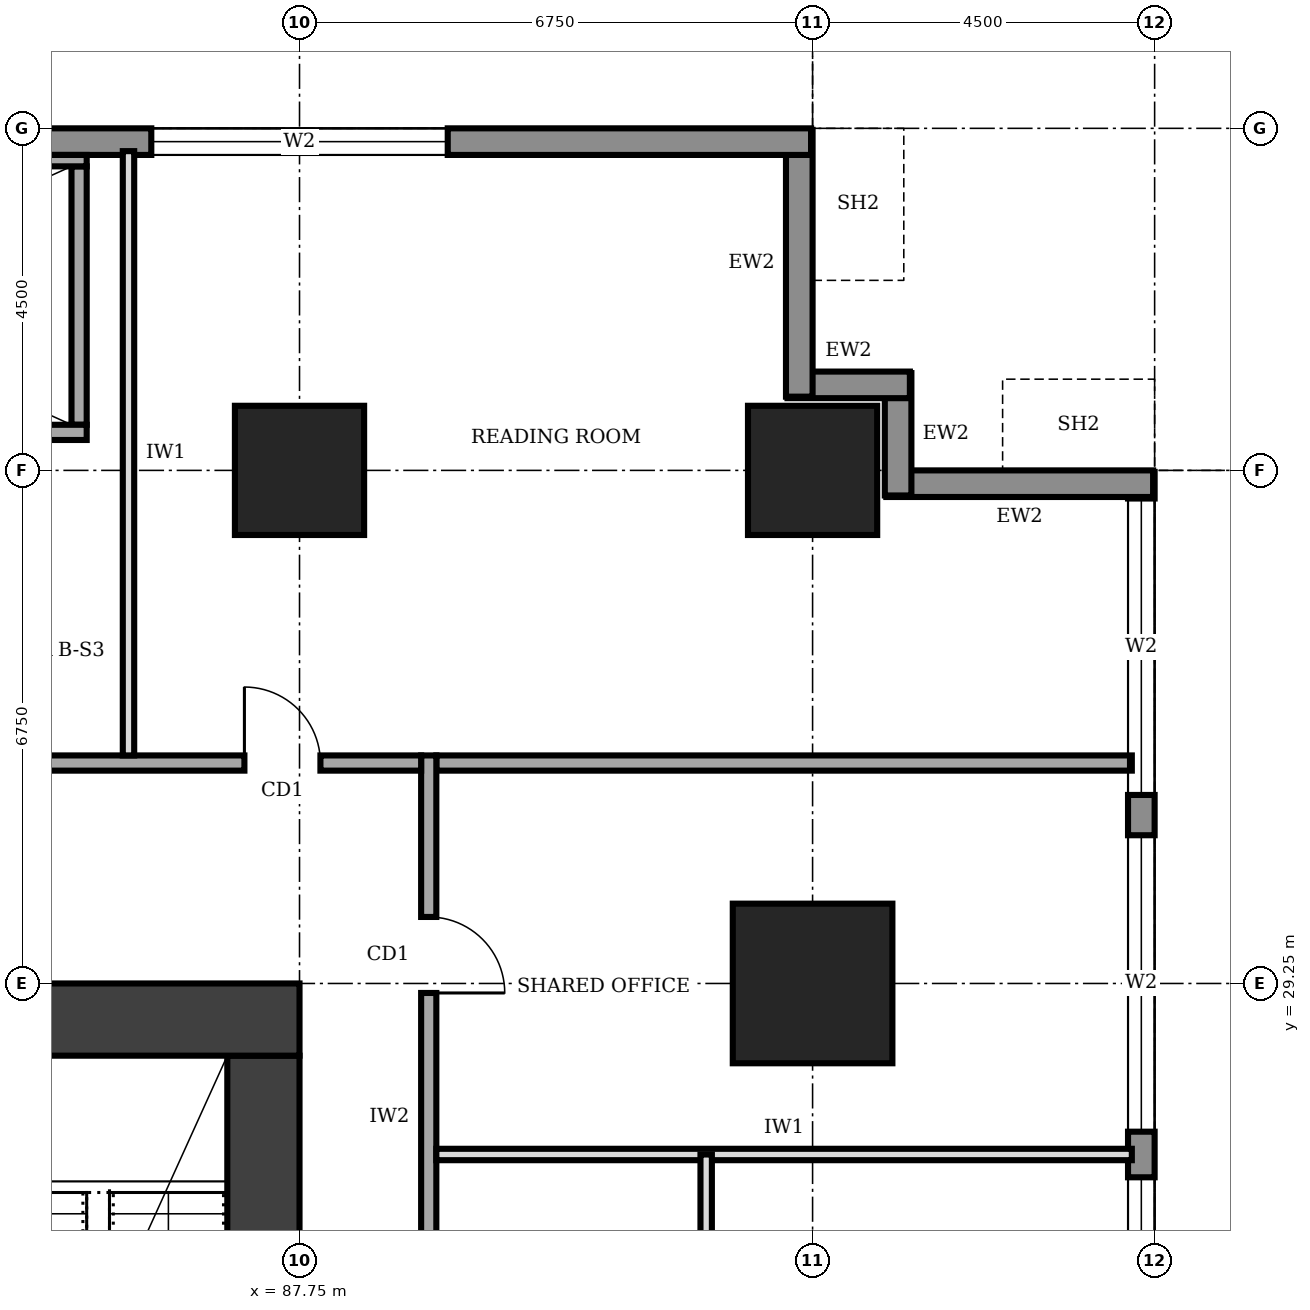
"""IFC4 building model, lengths in metres.
Left out: names, types, materials, properties, quantities, classifications, styles, units other than length and angle.
Written with IfcOpenShell. Run it as: python <this file> out.ifc"""

import sys

from ifc_helpers import new_model, si_unit, direction, frame, frame_2d, origin, origin_2d, place, context, subcontext, project, spatial, rectangle, extrude, element, fill, save


model = new_model("IFC4")
c1 = context("Model", 3, precision=1e-05, world=origin(), true_north=direction((0.0, 1.0)))
c2 = subcontext(c1, "Body", "Model", "MODEL_VIEW")
j1 = project(units=[si_unit("LENGTHUNIT", "METRE"), si_unit("PLANEANGLEUNIT", "RADIAN")], contexts=[c1])
p1 = place(None, origin())
s1 = spatial("IfcSite", under=j1, at=p1, CompositionType="ELEMENT")
p2 = place(p1, origin())
s2 = spatial("IfcBuilding", under=s1, at=p2, CompositionType="ELEMENT")
p3 = place(p2, frame((0.0, 0.0, 53.0)))
s3 = spatial("IfcBuildingStorey", under=s2, at=p3, CompositionType="ELEMENT", Elevation=53.0)
p4 = place(p3, frame((87.275, 12.2, 0.0), z_axis=(0.0, 0.0, 1.0), x_axis=(0.0, 1.0, 0.0)))
e1 = element("IfcWall", 1, at=p4, inside=s3, PredefinedType="SHEAR", context=c2, shape_type="SweptSolid", body=[
    extrude(rectangle(XDim=16.1, YDim=0.95, at=frame_2d((8.05, 0.0))), origin(), (0.0, 0.0, 1.0), 4.0),
])
p5 = place(p3, frame((87.75, 28.775, 0.0), z_axis=(0.0, 0.0, 1.0), x_axis=(-1.0, 0.0, 0.0)))
e2 = element("IfcWall", 2, at=p5, inside=s3, PredefinedType="SHEAR", context=c2, shape_type="SweptSolid", body=[
    extrude(rectangle(XDim=13.5, YDim=0.95, at=frame_2d((6.75, 0.0))), origin(), (0.0, 0.0, 1.0), 4.0),
])
p6 = place(p5, frame((4.75, 0.0, 0.0)))
e3 = element("IfcOpeningElement", 3, at=p6, cuts=e2, PredefinedType="OPENING", context=c2, shape_type="SweptSolid", body=[
    extrude(rectangle(XDim=1.8, YDim=2.1, at=frame_2d((0.9, 1.05))), frame((0.0, 0.485, 0.0), z_axis=(0.0, -1.0, 0.0), x_axis=(1.0, 0.0, 0.0)), (0.0, 0.0, 1.0), 0.97),
])
p7 = place(p3, frame((94.5, 29.25, 0.0), z_axis=(0.0, 0.0, 1.0), x_axis=(1.0, 0.0, 0.0)))
e4 = element("IfcColumn", 4, at=p7, inside=s3, PredefinedType="COLUMN", context=c2, shape_type="SweptSolid", body=[
    extrude(rectangle(XDim=2.1, YDim=2.1, at=origin_2d()), origin(), (0.0, 0.0, 1.0), 4.0),
])
for number, where, z_axis, x_axis in (
    (5, (87.75, 36.0, 0.0), (0.0, 0.0, 1.0), (1.0, 0.0, 0.0)),
    (6, (94.5, 36.0, 0.0), (0.0, 0.0, 1.0), (1.0, 0.0, 0.0)),
):
    element("IfcColumn", number, at=place(p3, frame(where, z_axis=z_axis, x_axis=x_axis)), inside=s3, PredefinedType="COLUMN", context=c2, shape_type="SweptSolid", body=[
        extrude(rectangle(XDim=1.7, YDim=1.7, at=origin_2d()), origin(), (0.0, 0.0, 1.0), 4.0),
    ])
p8 = place(p3, frame((98.825, 4.52, 0.0), z_axis=(0.0, 0.0, 1.0), x_axis=(0.0, 1.0, 0.0)))
e7 = element("IfcWall", 7, at=p8, inside=s3, PredefinedType="STANDARD", context=c2, shape_type="SweptSolid", body=[
    extrude(rectangle(XDim=31.46, YDim=0.35, at=frame_2d((15.73, 0.0))), origin(), (0.0, 0.0, 1.0), 3.75),
])
p9 = place(p8, frame((4.78, 0.0, 0.6)))
e8 = element("IfcOpeningElement", 8, at=p9, cuts=e7, PredefinedType="OPENING", context=c2, shape_type="SweptSolid", body=[
    extrude(rectangle(XDim=3.9, YDim=2.6, at=frame_2d((1.95, 1.3))), frame((0.0, 0.185, 0.0), z_axis=(0.0, -1.0, 0.0), x_axis=(1.0, 0.0, 0.0)), (0.0, 0.0, 1.0), 0.37),
])
p10 = place(p8, frame((9.28, 0.0, 0.6)))
e9 = element("IfcOpeningElement", 9, at=p10, cuts=e7, PredefinedType="OPENING", context=c2, shape_type="SweptSolid", body=[
    extrude(rectangle(XDim=3.9, YDim=2.6, at=frame_2d((1.95, 1.3))), frame((0.0, 0.185, 0.0), z_axis=(0.0, -1.0, 0.0), x_axis=(1.0, 0.0, 0.0)), (0.0, 0.0, 1.0), 0.37),
])
p11 = place(p8, frame((13.78, 0.0, 0.6)))
e10 = element("IfcOpeningElement", 10, at=p11, cuts=e7, PredefinedType="OPENING", context=c2, shape_type="SweptSolid", body=[
    extrude(rectangle(XDim=3.9, YDim=2.6, at=frame_2d((1.95, 1.3))), frame((0.0, 0.185, 0.0), z_axis=(0.0, -1.0, 0.0), x_axis=(1.0, 0.0, 0.0)), (0.0, 0.0, 1.0), 0.37),
])
p12 = place(p8, frame((18.28, 0.0, 0.6)))
e11 = element("IfcOpeningElement", 11, at=p12, cuts=e7, PredefinedType="OPENING", context=c2, shape_type="SweptSolid", body=[
    extrude(rectangle(XDim=3.9, YDim=2.6, at=frame_2d((1.95, 1.3))), frame((0.0, 0.185, 0.0), z_axis=(0.0, -1.0, 0.0), x_axis=(1.0, 0.0, 0.0)), (0.0, 0.0, 1.0), 0.37),
])
p13 = place(p8, frame((22.78, 0.0, 0.6)))
e12 = element("IfcOpeningElement", 12, at=p13, cuts=e7, PredefinedType="OPENING", context=c2, shape_type="SweptSolid", body=[
    extrude(rectangle(XDim=3.9, YDim=2.6, at=frame_2d((1.95, 1.3))), frame((0.0, 0.185, 0.0), z_axis=(0.0, -1.0, 0.0), x_axis=(1.0, 0.0, 0.0)), (0.0, 0.0, 1.0), 0.37),
])
p14 = place(p8, frame((27.21, 0.0, 0.6)))
e13 = element("IfcOpeningElement", 13, at=p14, cuts=e7, PredefinedType="OPENING", context=c2, shape_type="SweptSolid", body=[
    extrude(rectangle(XDim=3.9, YDim=2.6, at=frame_2d((1.95, 1.3))), frame((0.0, 0.185, 0.0), z_axis=(0.0, -1.0, 0.0), x_axis=(1.0, 0.0, 0.0)), (0.0, 0.0, 1.0), 0.37),
])
p15 = place(p3, frame((98.98, 35.825, 0.0), z_axis=(0.0, 0.0, 1.0), x_axis=(-1.0, 0.0, 0.0)))
e14 = element("IfcWall", 14, at=p15, inside=s3, PredefinedType="STANDARD", context=c2, shape_type="SweptSolid", body=[
    extrude(rectangle(XDim=3.51, YDim=0.35, at=frame_2d((1.755, 0.0))), origin(), (0.0, 0.0, 1.0), 2.85),
])
for number, where, z_axis, x_axis in (
    (15, (95.625, 35.67, 0.0), (0.0, 0.0, 1.0), (0.0, 1.0, 0.0)),
    (16, (95.78, 37.125, 0.0), (0.0, 0.0, 1.0), (-1.0, 0.0, 0.0)),
):
    element("IfcWall", number, at=place(p3, frame(where, z_axis=z_axis, x_axis=x_axis)), inside=s3, PredefinedType="STANDARD", context=c2, shape_type="SweptSolid", body=[
        extrude(rectangle(XDim=1.61, YDim=0.35, at=frame_2d((0.805, 0.0))), origin(), (0.0, 0.0, 1.0), 3.75),
    ])
p16 = place(p3, frame((94.325, 36.97, 0.0), z_axis=(0.0, 0.0, 1.0), x_axis=(0.0, 1.0, 0.0)))
e17 = element("IfcWall", 17, at=p16, inside=s3, PredefinedType="STANDARD", context=c2, shape_type="SweptSolid", body=[
    extrude(rectangle(XDim=3.51, YDim=0.35, at=frame_2d((1.755, 0.0))), origin(), (0.0, 0.0, 1.0), 2.85),
])
p17 = place(p3, frame((94.48, 40.325, 0.0), z_axis=(0.0, 0.0, 1.0), x_axis=(-1.0, 0.0, 0.0)))
e18 = element("IfcWall", 18, at=p17, inside=s3, PredefinedType="STANDARD", context=c2, shape_type="SweptSolid", body=[
    extrude(rectangle(XDim=26.96, YDim=0.35, at=frame_2d((13.48, 0.0))), origin(), (0.0, 0.0, 1.0), 3.75),
])
p18 = place(p17, frame((22.71, 0.0, 0.6)))
e19 = element("IfcOpeningElement", 19, at=p18, cuts=e18, PredefinedType="OPENING", context=c2, shape_type="SweptSolid", body=[
    extrude(rectangle(XDim=3.9, YDim=2.6, at=frame_2d((1.95, 1.3))), frame((0.0, 0.185, 0.0), z_axis=(0.0, -1.0, 0.0), x_axis=(1.0, 0.0, 0.0)), (0.0, 0.0, 1.0), 0.37),
])
p19 = place(p17, frame((18.28, 0.0, 0.6)))
e20 = element("IfcOpeningElement", 20, at=p19, cuts=e18, PredefinedType="OPENING", context=c2, shape_type="SweptSolid", body=[
    extrude(rectangle(XDim=3.9, YDim=2.6, at=frame_2d((1.95, 1.3))), frame((0.0, 0.185, 0.0), z_axis=(0.0, -1.0, 0.0), x_axis=(1.0, 0.0, 0.0)), (0.0, 0.0, 1.0), 0.37),
])
p20 = place(p17, frame((4.78, 0.0, 0.6)))
e21 = element("IfcOpeningElement", 21, at=p20, cuts=e18, PredefinedType="OPENING", context=c2, shape_type="SweptSolid", body=[
    extrude(rectangle(XDim=3.9, YDim=2.6, at=frame_2d((1.95, 1.3))), frame((0.0, 0.185, 0.0), z_axis=(0.0, -1.0, 0.0), x_axis=(1.0, 0.0, 0.0)), (0.0, 0.0, 1.0), 0.37),
])
p21 = place(p3, frame((89.45, 9.2, 0.0), z_axis=(0.0, 0.0, 1.0), x_axis=(0.0, 1.0, 0.0)))
e22 = element("IfcWall", 22, at=p21, inside=s3, PredefinedType="SOLIDWALL", context=c2, shape_type="SweptSolid", body=[
    extrude(rectangle(XDim=23.05, YDim=0.2, at=frame_2d((11.525, 0.0))), origin(), (0.0, 0.0, 1.0), 3.75),
])
p22 = place(p21, frame((1.55, 0.0, 0.0)))
e23 = element("IfcOpeningElement", 23, at=p22, cuts=e22, PredefinedType="OPENING", context=c2, shape_type="SweptSolid", body=[
    extrude(rectangle(XDim=1.0, YDim=2.1, at=frame_2d((0.5, 1.05))), frame((0.0, 0.11, 0.0), z_axis=(0.0, -1.0, 0.0), x_axis=(1.0, 0.0, 0.0)), (0.0, 0.0, 1.0), 0.22),
])
p23 = place(p21, frame((4.9, 0.0, 0.0)))
e24 = element("IfcOpeningElement", 24, at=p23, cuts=e22, PredefinedType="OPENING", context=c2, shape_type="SweptSolid", body=[
    extrude(rectangle(XDim=1.0, YDim=2.1, at=frame_2d((0.5, 1.05))), frame((0.0, 0.11, 0.0), z_axis=(0.0, -1.0, 0.0), x_axis=(1.0, 0.0, 0.0)), (0.0, 0.0, 1.0), 0.22),
])
p24 = place(p21, frame((8.0, 0.0, 0.0)))
e25 = element("IfcOpeningElement", 25, at=p24, cuts=e22, PredefinedType="OPENING", context=c2, shape_type="SweptSolid", body=[
    extrude(rectangle(XDim=0.9, YDim=2.1, at=frame_2d((0.45, 1.05))), frame((0.0, 0.11, 0.0), z_axis=(0.0, -1.0, 0.0), x_axis=(1.0, 0.0, 0.0)), (0.0, 0.0, 1.0), 0.22),
])
p25 = place(p21, frame((11.05, 0.0, 0.0)))
e26 = element("IfcOpeningElement", 26, at=p25, cuts=e22, PredefinedType="OPENING", context=c2, shape_type="SweptSolid", body=[
    extrude(rectangle(XDim=0.9, YDim=2.1, at=frame_2d((0.45, 1.05))), frame((0.0, 0.11, 0.0), z_axis=(0.0, -1.0, 0.0), x_axis=(1.0, 0.0, 0.0)), (0.0, 0.0, 1.0), 0.22),
])
p26 = place(p21, frame((15.75, 0.0, 0.0)))
e27 = element("IfcOpeningElement", 27, at=p26, cuts=e22, PredefinedType="OPENING", context=c2, shape_type="SweptSolid", body=[
    extrude(rectangle(XDim=0.9, YDim=2.1, at=frame_2d((0.45, 1.05))), frame((0.0, 0.11, 0.0), z_axis=(0.0, -1.0, 0.0), x_axis=(1.0, 0.0, 0.0)), (0.0, 0.0, 1.0), 0.22),
])
p27 = place(p21, frame((13.1, 0.0, 0.0)))
e28 = element("IfcOpeningElement", 28, at=p27, cuts=e22, PredefinedType="OPENING", context=c2, shape_type="SweptSolid", body=[
    extrude(rectangle(XDim=1.0, YDim=2.1, at=frame_2d((0.5, 1.05))), frame((0.0, 0.11, 0.0), z_axis=(0.0, -1.0, 0.0), x_axis=(1.0, 0.0, 0.0)), (0.0, 0.0, 1.0), 0.22),
])
p28 = place(p21, frame((19.925, 0.0, 0.0)))
e29 = element("IfcOpeningElement", 29, at=p28, cuts=e22, PredefinedType="OPENING", context=c2, shape_type="SweptSolid", body=[
    extrude(rectangle(XDim=1.0, YDim=2.1, at=frame_2d((0.5, 1.05))), frame((0.0, 0.11, 0.0), z_axis=(0.0, -1.0, 0.0), x_axis=(1.0, 0.0, 0.0)), (0.0, 0.0, 1.0), 0.22),
])
p29 = place(p3, frame((89.35, 32.15, 0.0), z_axis=(0.0, 0.0, 1.0), x_axis=(-1.0, 0.0, 0.0)))
e30 = element("IfcWall", 30, at=p29, inside=s3, PredefinedType="SOLIDWALL", context=c2, shape_type="SweptSolid", body=[
    extrude(rectangle(XDim=17.65, YDim=0.2, at=frame_2d((8.825, 0.0))), origin(), (0.0, 0.0, 1.0), 3.75),
])
p30 = place(p29, frame((14.75, 0.0, 0.0)))
e31 = element("IfcOpeningElement", 31, at=p30, cuts=e30, PredefinedType="OPENING", context=c2, shape_type="SweptSolid", body=[
    extrude(rectangle(XDim=1.0, YDim=2.1, at=frame_2d((0.5, 1.05))), frame((0.0, 0.11, 0.0), z_axis=(0.0, -1.0, 0.0), x_axis=(1.0, 0.0, 0.0)), (0.0, 0.0, 1.0), 0.22),
])
p31 = place(p29, frame((7.85, 0.0, 0.0)))
e32 = element("IfcOpeningElement", 32, at=p31, cuts=e30, PredefinedType="OPENING", context=c2, shape_type="SweptSolid", body=[
    extrude(rectangle(XDim=1.0, YDim=2.1, at=frame_2d((0.5, 1.05))), frame((0.0, 0.11, 0.0), z_axis=(0.0, -1.0, 0.0), x_axis=(1.0, 0.0, 0.0)), (0.0, 0.0, 1.0), 0.22),
])
p32 = place(p29, frame((1.325, 0.0, 0.0)))
e33 = element("IfcOpeningElement", 33, at=p32, cuts=e30, PredefinedType="OPENING", context=c2, shape_type="SweptSolid", body=[
    extrude(rectangle(XDim=1.0, YDim=2.1, at=frame_2d((0.5, 1.05))), frame((0.0, 0.11, 0.0), z_axis=(0.0, -1.0, 0.0), x_axis=(1.0, 0.0, 0.0)), (0.0, 0.0, 1.0), 0.22),
])
p33 = place(p3, frame((89.55, 32.15, 0.0), z_axis=(0.0, 0.0, 1.0), x_axis=(1.0, 0.0, 0.0)))
e34 = element("IfcWall", 34, at=p33, inside=s3, PredefinedType="SOLIDWALL", context=c2, shape_type="SweptSolid", body=[
    extrude(rectangle(XDim=9.15, YDim=0.2, at=frame_2d((4.575, 0.0))), origin(), (0.0, 0.0, 1.0), 3.75),
])
p34 = place(p3, frame((85.5, 32.25, 0.0), z_axis=(0.0, 0.0, 1.0), x_axis=(0.0, 1.0, 0.0)))
e35 = element("IfcWall", 35, at=p34, inside=s3, PredefinedType="PARTITIONING", context=c2, shape_type="SweptSolid", body=[
    extrude(rectangle(XDim=7.95, YDim=0.15, at=frame_2d((3.975, 0.0))), origin(), (0.0, 0.0, 1.0), 3.75),
])
p35 = place(p3, frame((89.55, 27.0, 0.0), z_axis=(0.0, 0.0, 1.0), x_axis=(1.0, 0.0, 0.0)))
e36 = element("IfcWall", 36, at=p35, inside=s3, PredefinedType="PARTITIONING", context=c2, shape_type="SweptSolid", body=[
    extrude(rectangle(XDim=9.15, YDim=0.15, at=frame_2d((4.575, 0.0))), origin(), (0.0, 0.0, 1.0), 3.75),
])
p36 = place(p3, frame((93.1, 23.8, 0.0), z_axis=(0.0, 0.0, 1.0), x_axis=(0.0, 1.0, 0.0)))
e37 = element("IfcWall", 37, at=p36, inside=s3, PredefinedType="PARTITIONING", context=c2, shape_type="SweptSolid", body=[
    extrude(rectangle(XDim=3.2, YDim=0.15, at=frame_2d((1.6, 0.0))), origin(), (0.0, 0.0, 1.0), 3.75),
])
p37 = place(p3, frame((77.05, 36.5, 0.0), z_axis=(0.0, 0.0, 1.0), x_axis=(1.0, 0.0, 0.0)))
e38 = element("IfcWall", 38, at=p37, inside=s3, PredefinedType="SOLIDWALL", context=c2, shape_type="SweptSolid", body=[
    extrude(rectangle(XDim=7.9, YDim=0.2, at=frame_2d((3.95, 0.0))), origin(), (0.0, 0.0, 1.0), 3.75),
])
p38 = place(p37, frame((6.3, 0.0, 0.0)))
e39 = element("IfcOpeningElement", 39, at=p38, cuts=e38, PredefinedType="OPENING", context=c2, shape_type="SweptSolid", body=[
    extrude(rectangle(XDim=1.0, YDim=2.1, at=frame_2d((0.5, 1.05))), frame((0.0, 0.11, 0.0), z_axis=(0.0, -1.0, 0.0), x_axis=(1.0, 0.0, 0.0)), (0.0, 0.0, 1.0), 0.22),
])
p39 = place(p3, frame((77.05, 40.075, 0.0), z_axis=(0.0, 0.0, 1.0), x_axis=(1.0, 0.0, 0.0)))
e40 = element("IfcWall", 40, at=p39, inside=s3, PredefinedType="SOLIDWALL", context=c2, shape_type="SweptSolid", body=[
    extrude(rectangle(XDim=7.9, YDim=0.15, at=frame_2d((3.95, 0.0))), origin(), (0.0, 0.0, 1.0), 3.75),
])
p40 = place(p3, frame((84.85, 36.6, 0.0), z_axis=(0.0, 0.0, 1.0), x_axis=(0.0, 1.0, 0.0)))
e41 = element("IfcWall", 41, at=p40, inside=s3, PredefinedType="SOLIDWALL", context=c2, shape_type="SweptSolid", body=[
    extrude(rectangle(XDim=3.4, YDim=0.2, at=frame_2d((1.7, 0.0))), origin(), (0.0, 0.0, 1.0), 3.75),
])
p41 = place(p12, origin())
e42 = element("IfcWindow", 42, at=p41, inside=s3, PartitioningType="SINGLE_PANEL", PredefinedType="WINDOW", context=c2, shape_type="SweptSolid", body=[
    extrude(rectangle(XDim=3.9, YDim=2.6, at=frame_2d((1.95, 1.3))), frame((0.0, 0.03, 0.0), z_axis=(0.0, -1.0, 0.0), x_axis=(1.0, 0.0, 0.0)), (0.0, 0.0, 1.0), 0.06),
])
fill(e11, e42)
p42 = place(p13, origin())
e43 = element("IfcWindow", 43, at=p42, inside=s3, PartitioningType="SINGLE_PANEL", PredefinedType="WINDOW", context=c2, shape_type="SweptSolid", body=[
    extrude(rectangle(XDim=3.9, YDim=2.6, at=frame_2d((1.95, 1.3))), frame((0.0, 0.03, 0.0), z_axis=(0.0, -1.0, 0.0), x_axis=(1.0, 0.0, 0.0)), (0.0, 0.0, 1.0), 0.06),
])
fill(e12, e43)
p43 = place(p14, origin())
e44 = element("IfcWindow", 44, at=p43, inside=s3, PartitioningType="SINGLE_PANEL", PredefinedType="WINDOW", context=c2, shape_type="SweptSolid", body=[
    extrude(rectangle(XDim=3.9, YDim=2.6, at=frame_2d((1.95, 1.3))), frame((0.0, 0.03, 0.0), z_axis=(0.0, -1.0, 0.0), x_axis=(1.0, 0.0, 0.0)), (0.0, 0.0, 1.0), 0.06),
])
fill(e13, e44)
p44 = place(p20, origin())
e45 = element("IfcWindow", 45, at=p44, inside=s3, PartitioningType="SINGLE_PANEL", PredefinedType="WINDOW", context=c2, shape_type="SweptSolid", body=[
    extrude(rectangle(XDim=3.9, YDim=2.6, at=frame_2d((1.95, 1.3))), frame((0.0, 0.03, 0.0), z_axis=(0.0, -1.0, 0.0), x_axis=(1.0, 0.0, 0.0)), (0.0, 0.0, 1.0), 0.06),
])
fill(e21, e45)
p45 = place(p28, frame((1.0, 0.0, 0.0), z_axis=(0.0, 0.0, 1.0), x_axis=(-1.0, 0.0, 0.0)))
e46 = element("IfcDoor", 46, at=p45, inside=s3, OperationType="SINGLE_SWING_RIGHT", PredefinedType="DOOR", context=c2, shape_type="SweptSolid", body=[
    extrude(rectangle(XDim=1.0, YDim=2.1, at=frame_2d((0.5, 1.05))), frame((0.0, 0.025, 0.0), z_axis=(0.0, -1.0, 0.0), x_axis=(1.0, 0.0, 0.0)), (0.0, 0.0, 1.0), 0.05),
])
fill(e29, e46)
p46 = place(p32, frame((1.0, 0.0, 0.0), z_axis=(0.0, 0.0, 1.0), x_axis=(-1.0, 0.0, 0.0)))
e47 = element("IfcDoor", 47, at=p46, inside=s3, OperationType="SINGLE_SWING_LEFT", PredefinedType="DOOR", context=c2, shape_type="SweptSolid", body=[
    extrude(rectangle(XDim=1.0, YDim=2.1, at=frame_2d((0.5, 1.05))), frame((0.0, 0.025, 0.0), z_axis=(0.0, -1.0, 0.0), x_axis=(1.0, 0.0, 0.0)), (0.0, 0.0, 1.0), 0.05),
])
fill(e33, e47)
save(model, sys.argv[1])
